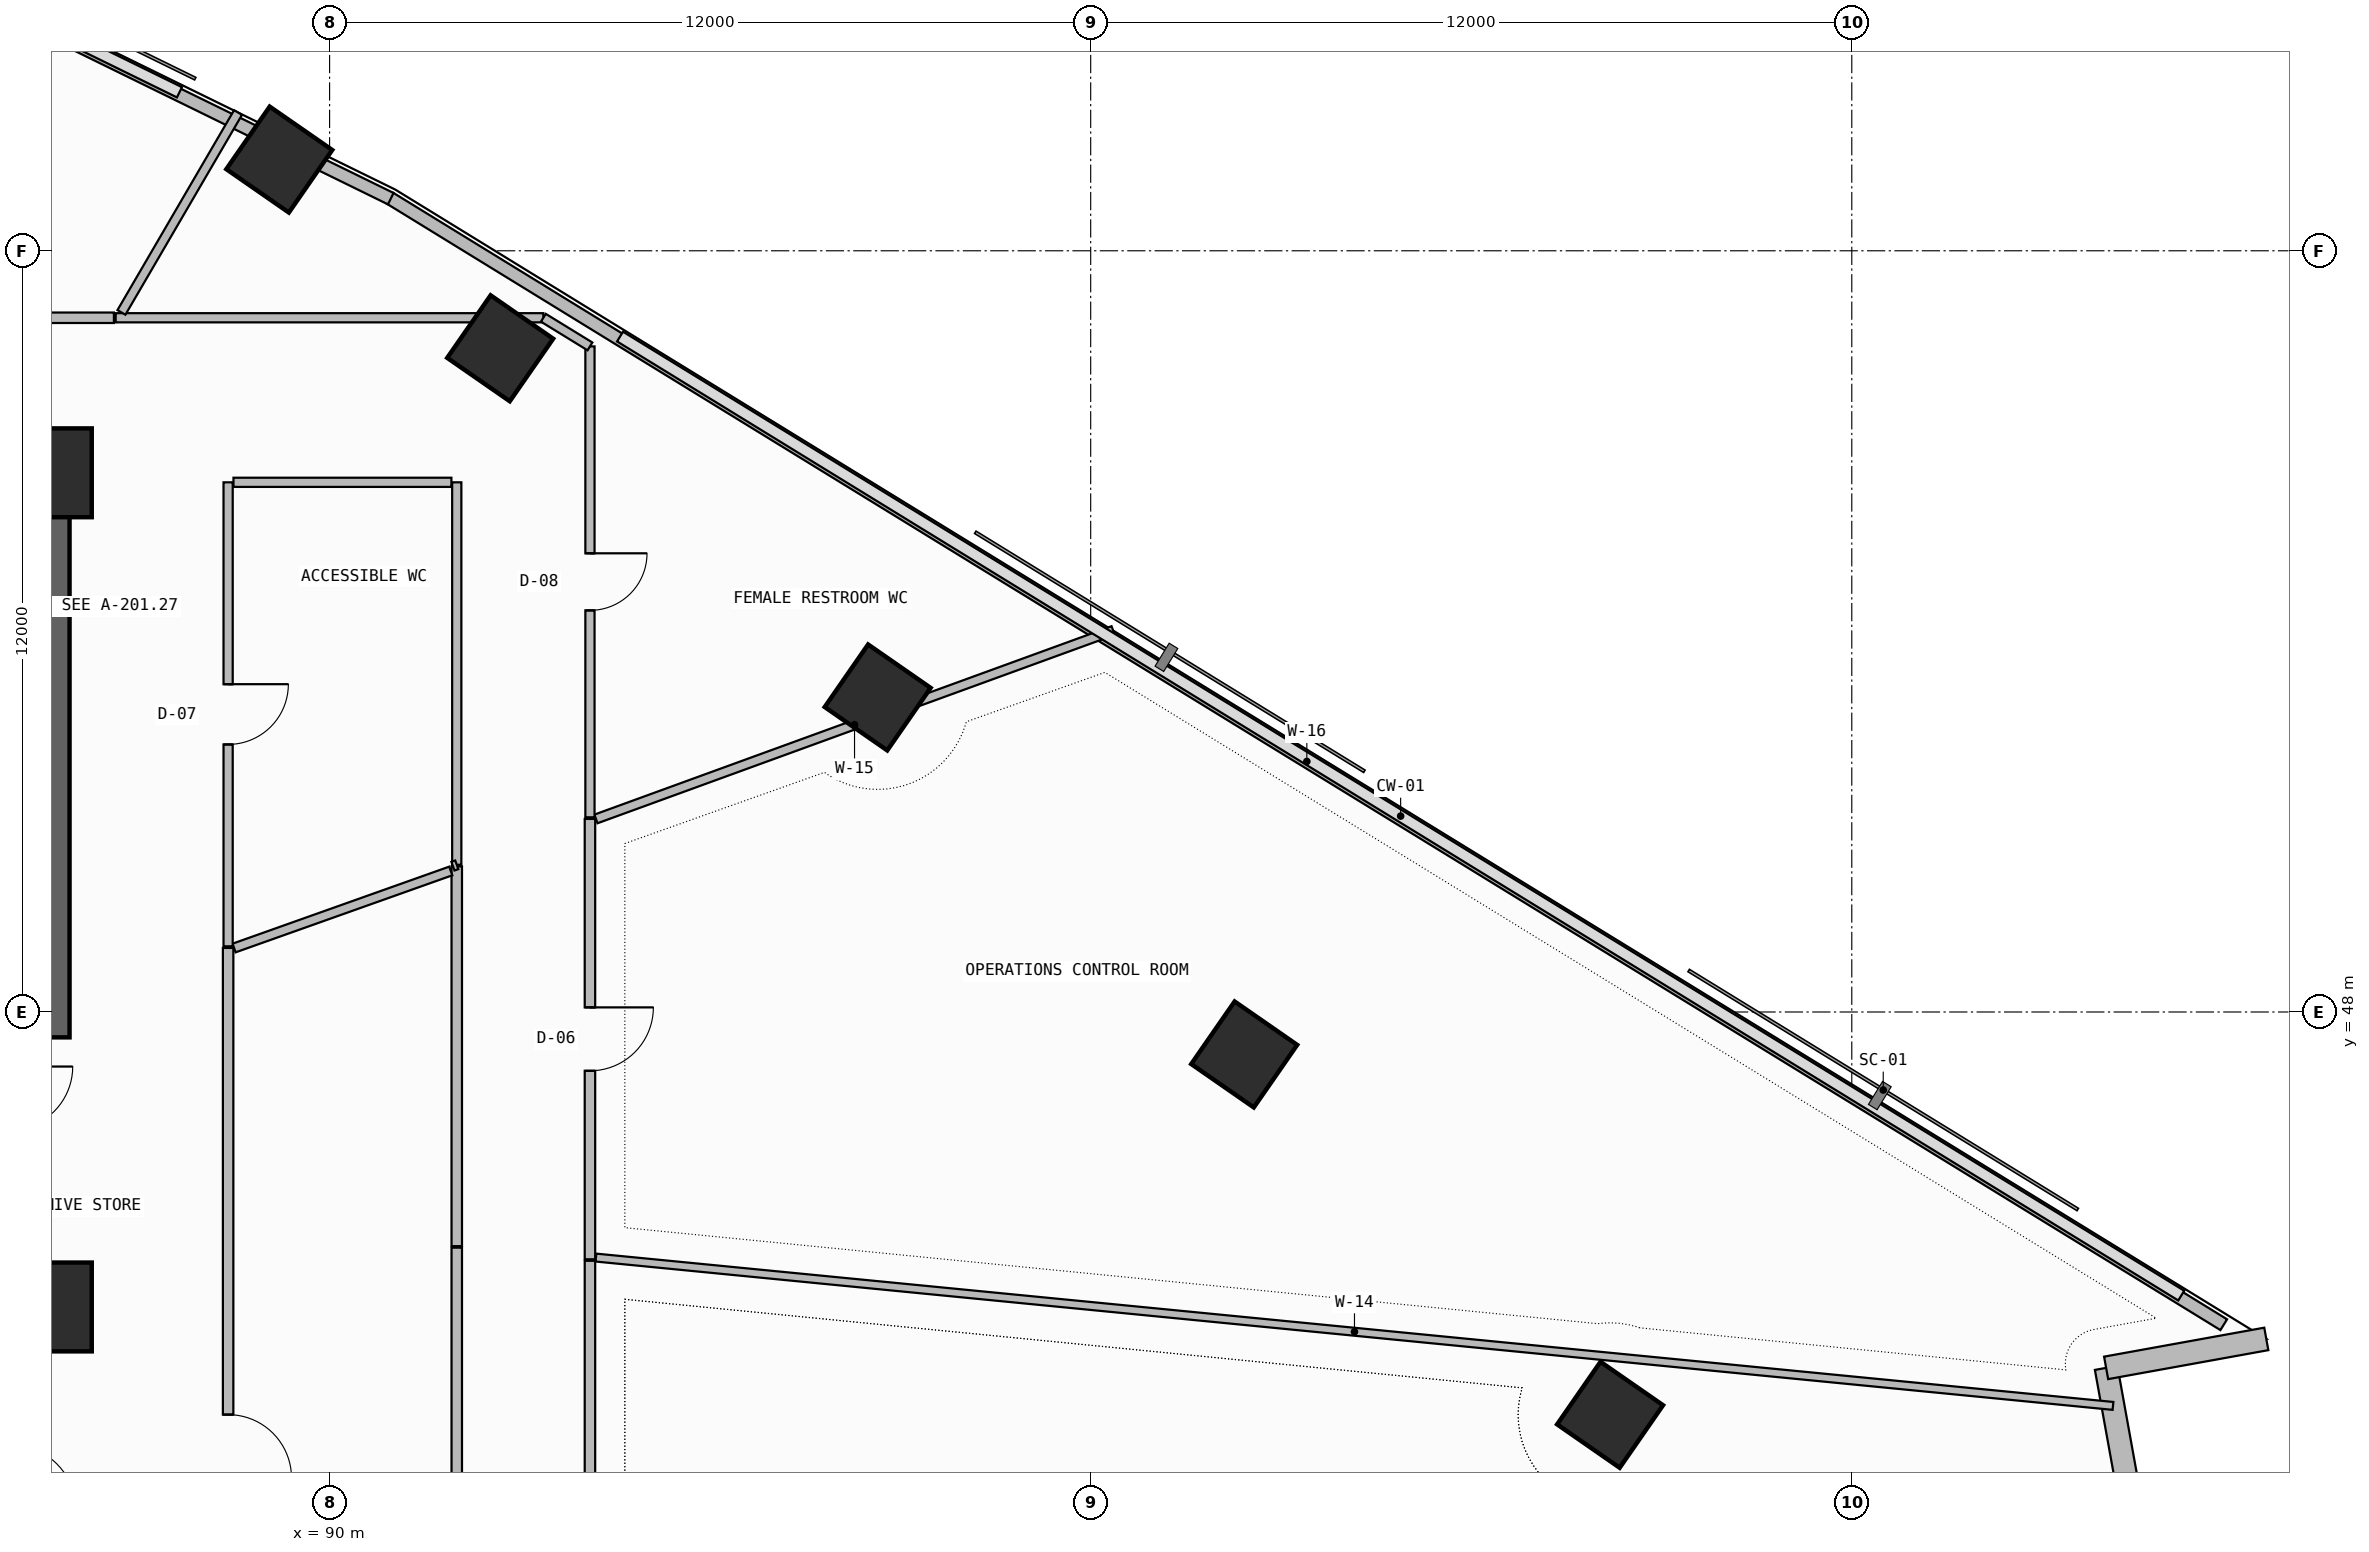
"""IFC4 building model, lengths in metres.
Left out: names, types, materials, properties, quantities, classifications, styles, units other than length and angle.
Written with IfcOpenShell. Run it as: python <this file> out.ifc"""

import sys

from ifc_helpers import new_model, si_unit, direction, frame, frame_2d, origin, origin_2d, place, context, subcontext, project, spatial, rectangle, extrude, element, fill, save


model = new_model("IFC4")
c1 = context("Model", 3, precision=1e-05, world=origin(), true_north=direction((0.0, 1.0)))
c2 = subcontext(c1, "Body", "Model", "MODEL_VIEW")
j1 = project(units=[si_unit("LENGTHUNIT", "METRE"), si_unit("PLANEANGLEUNIT", "RADIAN")], contexts=[c1])
p1 = place(None, origin())
s1 = spatial("IfcSite", under=j1, at=p1, CompositionType="ELEMENT")
p2 = place(p1, origin())
s2 = spatial("IfcBuilding", under=s1, at=p2, CompositionType="ELEMENT")
p3 = place(p2, frame((0.0, 0.0, 95.7)))
s3 = spatial("IfcBuildingStorey", under=s2, at=p3, CompositionType="ELEMENT", Elevation=95.7)
p4 = place(p3, frame((72.0, 56.5, -0.4), z_axis=(0.0, 0.0, 1.0), x_axis=(1.0, 0.0, 0.0)))
e1 = element("IfcWall", 1, at=p4, inside=s3, PredefinedType="SHEAR", context=c2, shape_type="SweptSolid", body=[
    extrude(rectangle(XDim=13.9, YDim=0.9, at=frame_2d((6.95, 0.0))), origin(), (0.0, 0.0, 1.0), 3.74),
])
p5 = place(p3, frame((85.45, 47.6, -0.4), z_axis=(0.0, 0.0, 1.0), x_axis=(0.0, 1.0, 0.0)))
e2 = element("IfcWall", 2, at=p5, inside=s3, PredefinedType="SHEAR", context=c2, shape_type="SweptSolid", body=[
    extrude(rectangle(XDim=8.45, YDim=0.9, at=frame_2d((4.225, 0.0))), origin(), (0.0, 0.0, 1.0), 3.74),
])
for number, where, z_axis, x_axis in (
    (3, (85.55, 43.35, 0.0), (0.0, 0.0, 1.0), (1.0, 0.0, 0.0)),
    (4, (85.55, 56.5, 0.0), (0.0, 0.0, 1.0), (1.0, 0.0, 0.0)),
):
    element("IfcColumn", number, at=place(p3, frame(where, z_axis=z_axis, x_axis=x_axis)), inside=s3, PredefinedType="COLUMN", context=c2, shape_type="SweptSolid", body=[
        extrude(rectangle(XDim=1.4, YDim=1.4, at=origin_2d()), origin(), (0.0, 0.0, 1.0), 3.6),
    ])
for number, where, z_axis, x_axis in (
    (5, (110.189, 41.65, -0.4), (0.0, 0.0, 1.0), (0.57, 0.822, 0.0)),
    (6, (104.42, 47.331, -0.4), (0.0, 0.0, 1.0), (0.57, 0.822, 0.0)),
    (7, (98.641, 52.958, -0.4), (0.0, 0.0, 1.0), (0.57, 0.822, 0.0)),
    (8, (92.69, 58.463, -0.4), (0.0, 0.0, 1.0), (0.57, 0.822, 0.0)),
):
    element("IfcColumn", number, at=place(p3, frame(where, z_axis=z_axis, x_axis=x_axis)), inside=s3, PredefinedType="COLUMN", context=c2, shape_type="SweptSolid", body=[
        extrude(rectangle(XDim=1.2, YDim=1.2, at=origin_2d()), origin(), (0.0, 0.0, 1.0), 4.0),
    ])
p6 = place(p3, frame((89.207, 61.438, 0.0), z_axis=(0.0, 0.0, 1.0), x_axis=(0.569996762596, 0.821646937942, 0.0)))
e9 = element("IfcColumn", 9, at=p6, inside=s3, PredefinedType="COLUMN", context=c2, shape_type="SweptSolid", body=[
    extrude(rectangle(XDim=1.2, YDim=1.2, at=origin_2d()), origin(), (0.0, 0.0, 1.0), 3.6),
])
p7 = place(p3, frame((118.467, 39.864, 0.0), z_axis=(0.0, 0.0, 1.0), x_axis=(-0.177897493713, 0.984049024048, 0.0)))
e10 = element("IfcWall", 10, at=p7, inside=s3, PredefinedType="SOLIDWALL", context=c2, shape_type="SweptSolid", body=[
    extrude(rectangle(XDim=2.566, YDim=0.36, at=frame_2d((1.283, 0.0))), origin(), (0.0, 0.0, 1.0), 3.34),
])
p8 = place(p3, frame((118.01, 42.39, 0.0), z_axis=(0.0, 0.0, 1.0), x_axis=(0.984046012923, 0.177914149102, 0.0)))
e11 = element("IfcWall", 11, at=p8, inside=s3, PredefinedType="SOLIDWALL", context=c2, shape_type="SweptSolid", body=[
    extrude(rectangle(XDim=2.566, YDim=0.36, at=frame_2d((1.283, 0.0))), origin(), (0.0, 0.0, 1.0), 3.34),
])
p9 = place(p3, frame((119.865, 43.07, 0.0), z_axis=(0.0, 0.0, 1.0), x_axis=(-0.852110824326, 0.52336138859, 0.0)))
e12 = element("IfcWall", 12, at=p9, inside=s3, PredefinedType="PARAPET", context=c2, shape_type="SweptSolid", body=[
    extrude(rectangle(XDim=33.932, YDim=0.2, at=frame_2d((16.966, 0.0))), origin(), (0.0, 0.0, 1.0), 1.15),
])
p10 = place(p3, frame((90.964, 60.822, 0.0), z_axis=(0.0, 0.0, 1.0), x_axis=(-0.898000468284, 0.439994498787, 0.0)))
e13 = element("IfcWall", 13, at=p10, inside=s3, PredefinedType="PARAPET", context=c2, shape_type="SweptSolid", body=[
    extrude(rectangle(XDim=1.423, YDim=0.2, at=frame_2d((0.712, 0.0))), origin(), (0.0, 0.0, 1.0), 1.15),
])
p11 = place(p3, frame((88.921, 61.823, 0.0), z_axis=(0.0, 0.0, 1.0), x_axis=(-0.897993533426, 0.440008652103, 0.0)))
e14 = element("IfcWall", 14, at=p11, inside=s3, PredefinedType="PARAPET", context=c2, shape_type="SweptSolid", body=[
    extrude(rectangle(XDim=26.864, YDim=0.2, at=frame_2d((13.432, 0.0))), origin(), (0.0, 0.0, 1.0), 1.15),
])
p12 = place(p3, frame((94.105, 44.102, 0.0), z_axis=(0.0, 0.0, 1.0), x_axis=(0.0, 1.0, 0.0)))
e15 = element("IfcWall", 15, at=p12, inside=s3, PredefinedType="PARTITIONING", context=c2, shape_type="SweptSolid", body=[
    extrude(rectangle(XDim=6.942, YDim=0.165, at=frame_2d((3.471, 0.0))), origin(), (0.0, 0.0, 1.0), 2.725),
])
p13 = place(p12, frame((2.971, 0.0, 0.0)))
e16 = element("IfcOpeningElement", 16, at=p13, cuts=e15, PredefinedType="OPENING", context=c2, shape_type="SweptSolid", body=[
    extrude(rectangle(XDim=1.0, YDim=2.2, at=frame_2d((0.5, 1.1))), frame((0.0, 0.093, 0.0), z_axis=(0.0, -1.0, 0.0), x_axis=(1.0, 0.0, 0.0)), (0.0, 0.0, 1.0), 0.185),
])
p14 = place(p3, frame((118.119, 41.79, 0.0), z_axis=(0.0, 0.0, 1.0), x_axis=(-0.995255314979, 0.097297780071, 0.0)))
e17 = element("IfcWall", 17, at=p14, inside=s3, PredefinedType="PARTITIONING", context=c2, shape_type="SweptSolid", body=[
    extrude(rectangle(XDim=24.033, YDim=0.125, at=frame_2d((12.017, 0.0))), origin(), (0.0, 0.0, 1.0), 2.725),
])
p15 = place(p3, frame((94.199, 51.043, 0.0), z_axis=(0.0, 0.0, 1.0), x_axis=(0.939622453011, 0.342212866206, 0.0)))
e18 = element("IfcWall", 18, at=p15, inside=s3, PredefinedType="PARTITIONING", context=c2, shape_type="SweptSolid", body=[
    extrude(rectangle(XDim=8.678, YDim=0.145, at=frame_2d((4.339, 0.0))), origin(), (0.0, 0.0, 1.0), 2.725),
])
p16 = place(p3, frame((88.4, 36.599, 0.0), z_axis=(0.0, 0.0, 1.0), x_axis=(0.0, 1.0, 0.0)))
e19 = element("IfcWall", 19, at=p16, inside=s3, PredefinedType="PARTITIONING", context=c2, shape_type="SweptSolid", body=[
    extrude(rectangle(XDim=12.411, YDim=0.165, at=frame_2d((6.205, 0.0))), origin(), (0.0, 0.0, 1.0), 2.725),
])
p17 = place(p16, frame((4.054, 0.0, 0.0)))
e20 = element("IfcOpeningElement", 20, at=p17, cuts=e19, PredefinedType="OPENING", context=c2, shape_type="SweptSolid", body=[
    extrude(rectangle(XDim=1.0, YDim=2.2, at=frame_2d((0.5, 1.1))), frame((0.0, 0.093, 0.0), z_axis=(0.0, -1.0, 0.0), x_axis=(1.0, 0.0, 0.0)), (0.0, 0.0, 1.0), 0.185),
])
p18 = place(p3, frame((92.005, 44.285, 0.0), z_axis=(0.0, 0.0, 1.0), x_axis=(0.0, -1.0, 0.0)))
e21 = element("IfcWall", 21, at=p18, inside=s3, PredefinedType="PARTITIONING", context=c2, shape_type="SweptSolid", body=[
    extrude(rectangle(XDim=7.529, YDim=0.165, at=frame_2d((3.764, 0.0))), origin(), (0.0, 0.0, 1.0), 2.725),
])
p19 = place(p3, frame((94.105, 37.136, 0.0), z_axis=(0.0, 0.0, 1.0), x_axis=(0.0, 1.0, 0.0)))
e22 = element("IfcWall", 22, at=p19, inside=s3, PredefinedType="PARTITIONING", context=c2, shape_type="SweptSolid", body=[
    extrude(rectangle(XDim=6.942, YDim=0.165, at=frame_2d((3.471, 0.0))), origin(), (0.0, 0.0, 1.0), 2.725),
])
p20 = place(p3, frame((92.005, 50.295, 0.0), z_axis=(0.0, 0.0, 1.0), x_axis=(0.0, -1.0, 0.0)))
e23 = element("IfcWall", 23, at=p20, inside=s3, PredefinedType="PARTITIONING", context=c2, shape_type="SweptSolid", body=[
    extrude(rectangle(XDim=5.986, YDim=0.165, at=frame_2d((2.993, 0.0))), origin(), (0.0, 0.0, 1.0), 2.725),
])
p21 = place(p3, frame((88.494, 49.009, 0.0), z_axis=(0.0, 0.0, 1.0), x_axis=(0.942234527784, 0.334953869439, 0.0)))
e24 = element("IfcWall", 24, at=p21, inside=s3, PredefinedType="PARTITIONING", context=c2, shape_type="SweptSolid", body=[
    extrude(rectangle(XDim=3.625, YDim=0.145, at=frame_2d((1.813, 0.0))), origin(), (0.0, 0.0, 1.0), 3.34),
])
p22 = place(p3, frame((88.4, 49.035, 0.0), z_axis=(0.0, 0.0, 1.0), x_axis=(0.0, 1.0, 0.0)))
e25 = element("IfcWall", 25, at=p22, inside=s3, PredefinedType="PARTITIONING", context=c2, shape_type="SweptSolid", body=[
    extrude(rectangle(XDim=7.315, YDim=0.145, at=frame_2d((3.657, 0.0))), origin(), (0.0, 0.0, 1.0), 2.725),
])
p23 = place(p22, frame((3.182, 0.0, 0.0)))
e26 = element("IfcOpeningElement", 26, at=p23, cuts=e25, PredefinedType="OPENING", context=c2, shape_type="SweptSolid", body=[
    extrude(rectangle(XDim=0.95, YDim=2.15, at=frame_2d((0.475, 1.075))), frame((0.0, 0.083, 0.0), z_axis=(0.0, -1.0, 0.0), x_axis=(1.0, 0.0, 0.0)), (0.0, 0.0, 1.0), 0.165),
])
p24 = place(p3, frame((92.005, 56.35, 0.0), z_axis=(0.0, 0.0, 1.0), x_axis=(0.0, -1.0, 0.0)))
e27 = element("IfcWall", 27, at=p24, inside=s3, PredefinedType="PARTITIONING", context=c2, shape_type="SweptSolid", body=[
    extrude(rectangle(XDim=6.03, YDim=0.145, at=frame_2d((3.015, 0.0))), origin(), (0.0, 0.0, 1.0), 2.725),
])
p25 = place(p3, frame((88.485, 56.35, 0.0), z_axis=(0.0, 0.0, 1.0), x_axis=(1.0, 0.0, 0.0)))
e28 = element("IfcWall", 28, at=p25, inside=s3, PredefinedType="PARTITIONING", context=c2, shape_type="SweptSolid", body=[
    extrude(rectangle(XDim=3.436, YDim=0.145, at=frame_2d((1.718, 0.0))), origin(), (0.0, 0.0, 1.0), 2.875),
])
p26 = place(p3, frame((92.005, 50.32, 0.0), z_axis=(0.0, 0.0, 1.0), x_axis=(-0.94234951348, -0.334630235399, 0.0)))
e29 = element("IfcWall", 29, at=p26, inside=s3, PredefinedType="PARTITIONING", context=c2, shape_type="SweptSolid", body=[
    extrude(rectangle(XDim=0.063, YDim=0.145, at=frame_2d((0.032, 0.0))), origin(), (0.0, 0.0, 1.0), 3.34),
])
p27 = place(p3, frame((94.105, 51.069, 0.0), z_axis=(0.0, 0.0, 1.0), x_axis=(0.0, 1.0, 0.0)))
e30 = element("IfcWall", 30, at=p27, inside=s3, PredefinedType="PARTITIONING", context=c2, shape_type="SweptSolid", body=[
    extrude(rectangle(XDim=7.424, YDim=0.145, at=frame_2d((3.712, 0.0))), origin(), (0.0, 0.0, 1.0), 2.725),
])
p28 = place(p27, frame((3.262, 0.0, 0.0)))
e31 = element("IfcOpeningElement", 31, at=p28, cuts=e30, PredefinedType="OPENING", context=c2, shape_type="SweptSolid", body=[
    extrude(rectangle(XDim=0.9, YDim=2.1, at=frame_2d((0.45, 1.05))), frame((0.0, 0.083, 0.0), z_axis=(0.0, -1.0, 0.0), x_axis=(1.0, 0.0, 0.0)), (0.0, 0.0, 1.0), 0.165),
])
p29 = place(p3, frame((93.37, 58.944, 0.0), z_axis=(0.0, 0.0, 1.0), x_axis=(-1.0, 0.0, 0.0)))
e32 = element("IfcWall", 32, at=p29, inside=s3, PredefinedType="PARTITIONING", context=c2, shape_type="SweptSolid", body=[
    extrude(rectangle(XDim=6.743, YDim=0.145, at=frame_2d((3.372, 0.0))), origin(), (0.0, 0.0, 1.0), 2.725),
])
p30 = place(p3, frame((94.105, 58.493, 0.0), z_axis=(0.0, 0.0, 1.0), x_axis=(-0.851998403327, 0.523544382769, 0.0)))
e33 = element("IfcWall", 33, at=p30, inside=s3, PredefinedType="PARTITIONING", context=c2, shape_type="SweptSolid", body=[
    extrude(rectangle(XDim=0.862, YDim=0.145, at=frame_2d((0.431, 0.0))), origin(), (0.0, 0.0, 1.0), 3.34),
])
p31 = place(p3, frame((86.718, 59.029, 0.0), z_axis=(0.0, 0.0, 1.0), x_axis=(0.503866864473, 0.863781328165, 0.0)))
e34 = element("IfcWall", 34, at=p31, inside=s3, PredefinedType="PARTITIONING", context=c2, shape_type="SweptSolid", body=[
    extrude(rectangle(XDim=3.648, YDim=0.145, at=frame_2d((1.824, 0.0))), origin(), (0.0, 0.0, 1.0), 3.34),
])
p32 = place(p3, frame((86.599, 58.944, 0.0), z_axis=(0.0, 0.0, 1.0), x_axis=(-1.0, 0.0, 0.0)))
e35 = element("IfcWall", 35, at=p32, inside=s3, PredefinedType="PARTITIONING", context=c2, shape_type="SweptSolid", body=[
    extrude(rectangle(XDim=8.128, YDim=0.165, at=frame_2d((4.064, 0.0))), origin(), (0.0, 0.0, 1.0), 3.34),
])
p33 = place(p32, frame((3.564, 0.0, 0.0)))
e36 = element("IfcOpeningElement", 36, at=p33, cuts=e35, PredefinedType="OPENING", context=c2, shape_type="SweptSolid", body=[
    extrude(rectangle(XDim=1.0, YDim=2.2, at=frame_2d((0.5, 1.1))), frame((0.0, 0.093, 0.0), z_axis=(0.0, -1.0, 0.0), x_axis=(1.0, 0.0, 0.0)), (0.0, 0.0, 1.0), 0.185),
])
p34 = place(p13, frame((1.0, 0.0, 0.0), z_axis=(0.0, 0.0, 1.0), x_axis=(-1.0, 0.0, 0.0)))
e37 = element("IfcDoor", 37, at=p34, inside=s3, OperationType="SINGLE_SWING_LEFT", PredefinedType="DOOR", context=c2, shape_type="SweptSolid", body=[
    extrude(rectangle(XDim=1.0, YDim=2.2, at=frame_2d((0.5, 1.1))), frame((0.0, 0.025, 0.0), z_axis=(0.0, -1.0, 0.0), x_axis=(1.0, 0.0, 0.0)), (0.0, 0.0, 1.0), 0.05),
])
fill(e16, e37)
p35 = place(p17, frame((1.0, 0.0, 0.0), z_axis=(0.0, 0.0, 1.0), x_axis=(-1.0, 0.0, 0.0)))
e38 = element("IfcDoor", 38, at=p35, inside=s3, OperationType="SINGLE_SWING_RIGHT", PredefinedType="DOOR", context=c2, shape_type="SweptSolid", body=[
    extrude(rectangle(XDim=1.0, YDim=2.2, at=frame_2d((0.5, 1.1))), frame((0.0, 0.025, 0.0), z_axis=(0.0, -1.0, 0.0), x_axis=(1.0, 0.0, 0.0)), (0.0, 0.0, 1.0), 0.05),
])
fill(e20, e38)
p36 = place(p23, frame((0.95, 0.0, 0.0), z_axis=(0.0, 0.0, 1.0), x_axis=(-1.0, 0.0, 0.0)))
e39 = element("IfcDoor", 39, at=p36, inside=s3, OperationType="SINGLE_SWING_LEFT", PredefinedType="DOOR", context=c2, shape_type="SweptSolid", body=[
    extrude(rectangle(XDim=0.95, YDim=2.15, at=frame_2d((0.475, 1.075))), frame((0.0, 0.025, 0.0), z_axis=(0.0, -1.0, 0.0), x_axis=(1.0, 0.0, 0.0)), (0.0, 0.0, 1.0), 0.05),
])
fill(e26, e39)
p37 = place(p28, frame((0.9, 0.0, 0.0), z_axis=(0.0, 0.0, 1.0), x_axis=(-1.0, 0.0, 0.0)))
e40 = element("IfcDoor", 40, at=p37, inside=s3, OperationType="SINGLE_SWING_LEFT", PredefinedType="DOOR", context=c2, shape_type="SweptSolid", body=[
    extrude(rectangle(XDim=0.9, YDim=2.1, at=frame_2d((0.45, 1.05))), frame((0.0, 0.025, 0.0), z_axis=(0.0, -1.0, 0.0), x_axis=(1.0, 0.0, 0.0)), (0.0, 0.0, 1.0), 0.05),
])
fill(e31, e40)
save(model, sys.argv[1])
